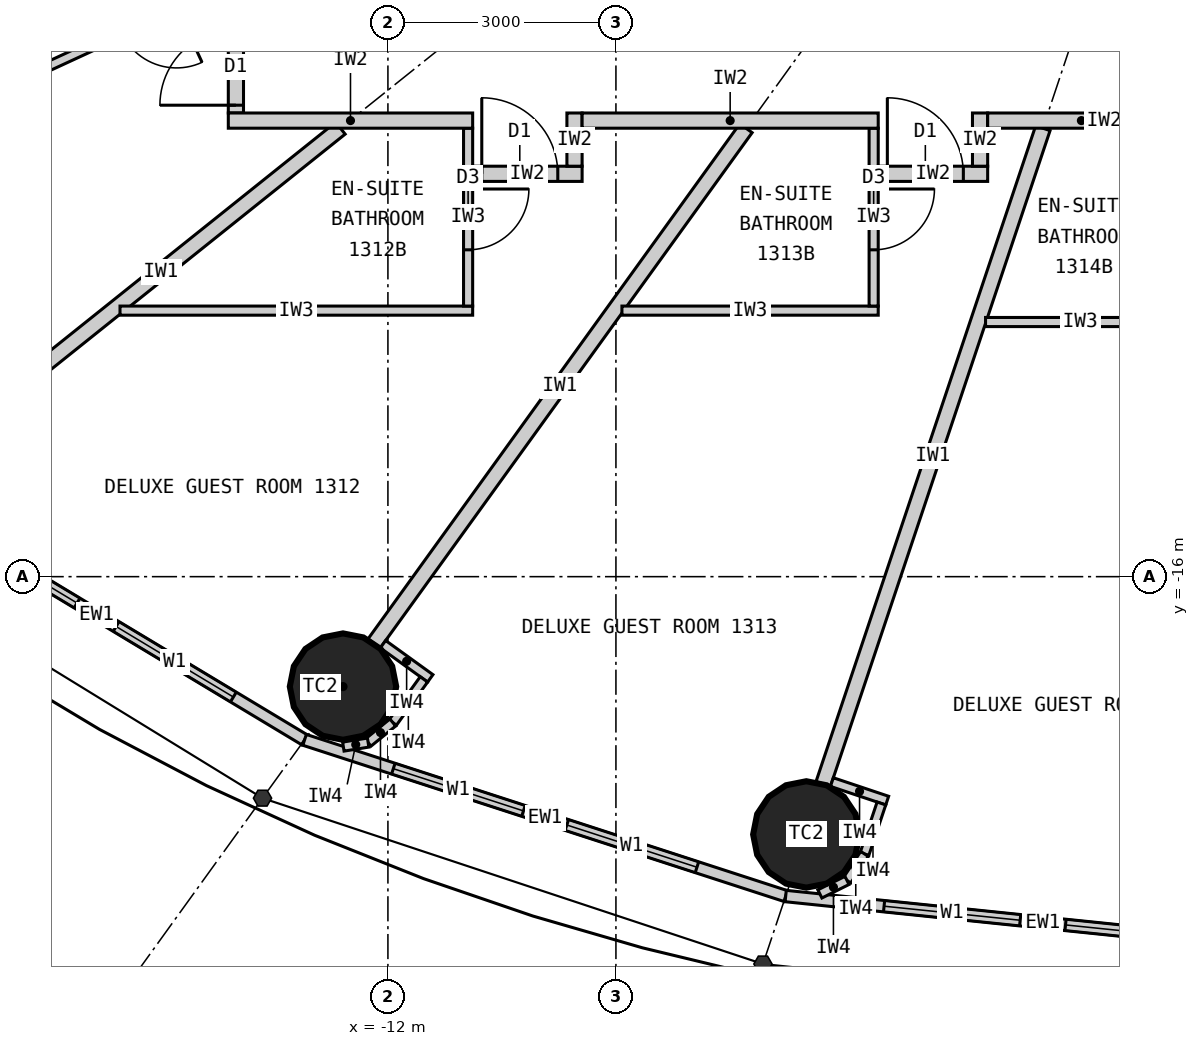
"""IFC4 building model, lengths in metres.
Left out: names, types, materials, properties, quantities, classifications, styles, units other than length and angle.
Written with IfcOpenShell. Run it as: python <this file> out.ifc"""

import sys

from ifc_helpers import new_model, si_unit, direction, frame, frame_2d, origin, origin_2d, place, context, subcontext, project, spatial, rectangle, circle, extrude, element, fill, save


model = new_model("IFC4")
c1 = context("Model", 3, precision=1e-05, world=origin(), true_north=direction((0.0, 1.0)))
c2 = subcontext(c1, "Body", "Model", "MODEL_VIEW")
j1 = project(units=[si_unit("LENGTHUNIT", "METRE"), si_unit("PLANEANGLEUNIT", "RADIAN")], contexts=[c1])
p1 = place(None, origin())
s1 = spatial("IfcSite", under=j1, at=p1, CompositionType="ELEMENT")
p2 = place(p1, origin())
s2 = spatial("IfcBuilding", under=s1, at=p2, CompositionType="ELEMENT")
p3 = place(p2, frame((0.0, 0.0, 57.3)))
s3 = spatial("IfcBuildingStorey", under=s2, at=p3, CompositionType="ELEMENT", Elevation=57.3)
for number, where, z_axis, x_axis in (
    (1, (-12.591, -17.447, 0.0), (0.0, 0.0, 1.0), (1.0, 0.0, 0.0)),
    (2, (-6.495, -19.391, 0.0), (0.0, 0.0, 1.0), (1.0, 0.0, 0.0)),
):
    element("IfcColumn", number, at=place(p3, frame(where, z_axis=z_axis, x_axis=x_axis)), inside=s3, PredefinedType="COLUMN", context=c2, shape_type="SweptSolid", body=[
        extrude(circle(Radius=0.7, at=origin_2d()), origin(), (0.0, 0.0, 1.0), 3.3),
    ])
p4 = place(p3, frame((-18.57, -14.856, 0.0), z_axis=(0.0, 0.0, 1.0), x_axis=(0.856983180864, -0.515344377787, 0.0)))
e3 = element("IfcWall", 3, at=p4, inside=s3, PredefinedType="ELEMENTEDWALL", context=c2, shape_type="SweptSolid", body=[
    extrude(rectangle(XDim=6.386, YDim=0.15, at=frame_2d((3.193, 0.0))), origin(), (0.0, 0.0, 1.0), 3.12),
])
p5 = place(p4, frame((1.093, 0.0, 0.9)))
e4 = element("IfcOpeningElement", 4, at=p5, cuts=e3, PredefinedType="OPENING", context=c2, shape_type="SweptSolid", body=[
    extrude(rectangle(XDim=1.8, YDim=1.9, at=frame_2d((0.9, 0.95))), frame((0.0, 0.085, 0.0), z_axis=(0.0, -1.0, 0.0), x_axis=(1.0, 0.0, 0.0)), (0.0, 0.0, 1.0), 0.17),
])
p6 = place(p4, frame((3.493, 0.0, 0.9)))
e5 = element("IfcOpeningElement", 5, at=p6, cuts=e3, PredefinedType="OPENING", context=c2, shape_type="SweptSolid", body=[
    extrude(rectangle(XDim=1.8, YDim=1.9, at=frame_2d((0.9, 0.95))), frame((0.0, 0.085, 0.0), z_axis=(0.0, -1.0, 0.0), x_axis=(1.0, 0.0, 0.0)), (0.0, 0.0, 1.0), 0.17),
])
p7 = place(p3, frame((-13.096, -18.147, 0.0), z_axis=(0.0, 0.0, 1.0), x_axis=(0.951137534625, -0.308767534285, 0.0)))
e6 = element("IfcWall", 6, at=p7, inside=s3, PredefinedType="ELEMENTEDWALL", context=c2, shape_type="SweptSolid", body=[
    extrude(rectangle(XDim=6.655, YDim=0.15, at=frame_2d((3.328, 0.0))), origin(), (0.0, 0.0, 1.0), 3.12),
])
p8 = place(p7, frame((1.228, 0.0, 0.9)))
e7 = element("IfcOpeningElement", 7, at=p8, cuts=e6, PredefinedType="OPENING", context=c2, shape_type="SweptSolid", body=[
    extrude(rectangle(XDim=1.8, YDim=1.9, at=frame_2d((0.9, 0.95))), frame((0.0, 0.085, 0.0), z_axis=(0.0, -1.0, 0.0), x_axis=(1.0, 0.0, 0.0)), (0.0, 0.0, 1.0), 0.17),
])
p9 = place(p7, frame((3.628, 0.0, 0.9)))
e8 = element("IfcOpeningElement", 8, at=p9, cuts=e6, PredefinedType="OPENING", context=c2, shape_type="SweptSolid", body=[
    extrude(rectangle(XDim=1.8, YDim=1.9, at=frame_2d((0.9, 0.95))), frame((0.0, 0.085, 0.0), z_axis=(0.0, -1.0, 0.0), x_axis=(1.0, 0.0, 0.0)), (0.0, 0.0, 1.0), 0.17),
])
p10 = place(p3, frame((-6.766, -20.202, 0.0), z_axis=(0.0, 0.0, 1.0), x_axis=(0.994721394369, -0.102612609291, 0.0)))
e9 = element("IfcWall", 9, at=p10, inside=s3, PredefinedType="ELEMENTEDWALL", context=c2, shape_type="SweptSolid", body=[
    extrude(rectangle(XDim=6.802, YDim=0.15, at=frame_2d((3.401, 0.0))), origin(), (0.0, 0.0, 1.0), 3.12),
])
p11 = place(p10, frame((1.301, 0.0, 0.9)))
e10 = element("IfcOpeningElement", 10, at=p11, cuts=e9, PredefinedType="OPENING", context=c2, shape_type="SweptSolid", body=[
    extrude(rectangle(XDim=1.8, YDim=1.9, at=frame_2d((0.9, 0.95))), frame((0.0, 0.085, 0.0), z_axis=(0.0, -1.0, 0.0), x_axis=(1.0, 0.0, 0.0)), (0.0, 0.0, 1.0), 0.17),
])
p12 = place(p10, frame((3.701, 0.0, 0.9)))
e11 = element("IfcOpeningElement", 11, at=p12, cuts=e9, PredefinedType="OPENING", context=c2, shape_type="SweptSolid", body=[
    extrude(rectangle(XDim=1.8, YDim=1.9, at=frame_2d((0.9, 0.95))), frame((0.0, 0.085, 0.0), z_axis=(0.0, -1.0, 0.0), x_axis=(1.0, 0.0, 0.0)), (0.0, 0.0, 1.0), 0.17),
])
p13 = place(p3, frame((-14.1, -6.512, 0.0), z_axis=(0.0, 0.0, 1.0), x_axis=(-0.907832871056, -0.419332181247, 0.0)))
e12 = element("IfcWall", 12, at=p13, inside=s3, PredefinedType="PARTITIONING", context=c2, shape_type="SweptSolid", body=[
    extrude(rectangle(XDim=8.023, YDim=0.2, at=frame_2d((4.011, 0.0))), origin(), (0.0, 0.0, 1.0), 2.32),
])
p14 = place(p3, frame((-12.625, -10.1, 0.0), z_axis=(0.0, 0.0, 1.0), x_axis=(-0.780892451574, -0.624665493744, 0.0)))
e13 = element("IfcWall", 13, at=p14, inside=s3, PredefinedType="PARTITIONING", context=c2, shape_type="SweptSolid", body=[
    extrude(rectangle(XDim=6.045, YDim=0.2, at=frame_2d((3.022, 0.0))), origin(), (0.0, 0.0, 1.0), 2.32),
])
p15 = place(p3, frame((-7.289, -10.1, 0.0), z_axis=(0.0, 0.0, 1.0), x_axis=(-0.585198353053, -0.810890182197, 0.0)))
e14 = element("IfcWall", 14, at=p15, inside=s3, PredefinedType="PARTITIONING", context=c2, shape_type="SweptSolid", body=[
    extrude(rectangle(XDim=8.36, YDim=0.2, at=frame_2d((4.18, 0.0))), origin(), (0.0, 0.0, 1.0), 2.32),
])
p16 = place(p3, frame((-3.383, -10.1, 0.0), z_axis=(0.0, 0.0, 1.0), x_axis=(-0.31759592231, -0.948226149256, 0.0)))
e15 = element("IfcWall", 15, at=p16, inside=s3, PredefinedType="PARTITIONING", context=c2, shape_type="SweptSolid", body=[
    extrude(rectangle(XDim=9.098, YDim=0.2, at=frame_2d((4.549, 0.0))), origin(), (0.0, 0.0, 1.0), 2.32),
])
p17 = place(p3, frame((-14.1, -8.193, 0.0), z_axis=(0.0, 0.0, 1.0), x_axis=(-0.907836493557, -0.419324338628, 0.0)))
e16 = element("IfcWall", 16, at=p17, inside=s3, PredefinedType="PARTITIONING", context=c2, shape_type="SweptSolid", body=[
    extrude(rectangle(XDim=3.49, YDim=0.12, at=frame_2d((1.745, 0.0))), origin(), (0.0, 0.0, 1.0), 3.12),
])
p18 = place(p17, frame((0.75, 0.0, 0.0)))
e17 = element("IfcOpeningElement", 17, at=p18, cuts=e16, PredefinedType="OPENING", context=c2, shape_type="SweptSolid", body=[
    extrude(rectangle(XDim=0.8, YDim=2.1, at=frame_2d((0.4, 1.05))), frame((0.0, 0.07, 0.0), z_axis=(0.0, -1.0, 0.0), x_axis=(1.0, 0.0, 0.0)), (0.0, 0.0, 1.0), 0.14),
])
p19 = place(p3, frame((-15.525, -12.5, 0.0), z_axis=(0.0, 0.0, 1.0), x_axis=(1.0, 0.0, 0.0)))
e18 = element("IfcWall", 18, at=p19, inside=s3, PredefinedType="PARTITIONING", context=c2, shape_type="SweptSolid", body=[
    extrude(rectangle(XDim=4.64, YDim=0.12, at=frame_2d((2.32, 0.0))), origin(), (0.0, 0.0, 1.0), 3.12),
])
p20 = place(p3, frame((-10.945, -10.1, 0.0), z_axis=(0.0, 0.0, 1.0), x_axis=(0.0, -1.0, 0.0)))
e19 = element("IfcWall", 19, at=p20, inside=s3, PredefinedType="PARTITIONING", context=c2, shape_type="SweptSolid", body=[
    extrude(rectangle(XDim=2.34, YDim=0.12, at=frame_2d((1.17, 0.0))), origin(), (0.0, 0.0, 1.0), 3.12),
])
p21 = place(p20, frame((0.8, 0.0, 0.0)))
e20 = element("IfcOpeningElement", 20, at=p21, cuts=e19, PredefinedType="OPENING", context=c2, shape_type="SweptSolid", body=[
    extrude(rectangle(XDim=0.8, YDim=2.1, at=frame_2d((0.4, 1.05))), frame((0.0, 0.07, 0.0), z_axis=(0.0, -1.0, 0.0), x_axis=(1.0, 0.0, 0.0)), (0.0, 0.0, 1.0), 0.14),
])
p22 = place(p3, frame((-8.921, -12.5, 0.0), z_axis=(0.0, 0.0, 1.0), x_axis=(1.0, 0.0, 0.0)))
e21 = element("IfcWall", 21, at=p22, inside=s3, PredefinedType="PARTITIONING", context=c2, shape_type="SweptSolid", body=[
    extrude(rectangle(XDim=3.372, YDim=0.12, at=frame_2d((1.686, 0.0))), origin(), (0.0, 0.0, 1.0), 3.12),
])
p23 = place(p3, frame((-5.609, -10.1, 0.0), z_axis=(0.0, 0.0, 1.0), x_axis=(0.0, -1.0, 0.0)))
e22 = element("IfcWall", 22, at=p23, inside=s3, PredefinedType="PARTITIONING", context=c2, shape_type="SweptSolid", body=[
    extrude(rectangle(XDim=2.34, YDim=0.12, at=frame_2d((1.17, 0.0))), origin(), (0.0, 0.0, 1.0), 3.12),
])
p24 = place(p23, frame((0.8, 0.0, 0.0)))
e23 = element("IfcOpeningElement", 23, at=p24, cuts=e22, PredefinedType="OPENING", context=c2, shape_type="SweptSolid", body=[
    extrude(rectangle(XDim=0.8, YDim=2.1, at=frame_2d((0.4, 1.05))), frame((0.0, 0.07, 0.0), z_axis=(0.0, -1.0, 0.0), x_axis=(1.0, 0.0, 0.0)), (0.0, 0.0, 1.0), 0.14),
])
p25 = place(p3, frame((-4.137, -12.65, 0.0), z_axis=(0.0, 0.0, 1.0), x_axis=(1.0, 0.0, 0.0)))
e24 = element("IfcWall", 24, at=p25, inside=s3, PredefinedType="PARTITIONING", context=c2, shape_type="SweptSolid", body=[
    extrude(rectangle(XDim=2.494, YDim=0.12, at=frame_2d((1.247, 0.0))), origin(), (0.0, 0.0, 1.0), 3.12),
])
p26 = place(p3, frame((-9.445, -10.7, 0.0), z_axis=(0.0, 0.0, 1.0), x_axis=(-1.0, 0.0, 0.0)))
e25 = element("IfcWall", 25, at=p26, inside=s3, PredefinedType="PARTITIONING", context=c2, shape_type="SweptSolid", body=[
    extrude(rectangle(XDim=1.44, YDim=0.2, at=frame_2d((0.72, 0.0))), origin(), (0.0, 0.0, 1.0), 3.12),
])
p27 = place(p26, frame((0.32, 0.0, 0.0)))
e26 = element("IfcOpeningElement", 26, at=p27, cuts=e25, PredefinedType="OPENING", context=c2, shape_type="SweptSolid", body=[
    extrude(rectangle(XDim=1.0, YDim=2.2, at=frame_2d((0.5, 1.1))), frame((0.0, 0.11, 0.0), z_axis=(0.0, -1.0, 0.0), x_axis=(1.0, 0.0, 0.0)), (0.0, 0.0, 1.0), 0.22),
])
p28 = place(p3, frame((-9.545, -9.9, 0.0), z_axis=(0.0, 0.0, 1.0), x_axis=(0.0, -1.0, 0.0)))
e27 = element("IfcWall", 27, at=p28, inside=s3, PredefinedType="PARTITIONING", context=c2, shape_type="SweptSolid", body=[
    extrude(rectangle(XDim=0.7, YDim=0.2, at=frame_2d((0.35, 0.0))), origin(), (0.0, 0.0, 1.0), 3.12),
])
p29 = place(p3, frame((-4.109, -10.7, 0.0), z_axis=(0.0, 0.0, 1.0), x_axis=(-1.0, 0.0, 0.0)))
e28 = element("IfcWall", 28, at=p29, inside=s3, PredefinedType="PARTITIONING", context=c2, shape_type="SweptSolid", body=[
    extrude(rectangle(XDim=1.44, YDim=0.2, at=frame_2d((0.72, 0.0))), origin(), (0.0, 0.0, 1.0), 3.12),
])
p30 = place(p29, frame((0.32, 0.0, 0.0)))
e29 = element("IfcOpeningElement", 29, at=p30, cuts=e28, PredefinedType="OPENING", context=c2, shape_type="SweptSolid", body=[
    extrude(rectangle(XDim=1.0, YDim=2.2, at=frame_2d((0.5, 1.1))), frame((0.0, 0.11, 0.0), z_axis=(0.0, -1.0, 0.0), x_axis=(1.0, 0.0, 0.0)), (0.0, 0.0, 1.0), 0.22),
])
p31 = place(p3, frame((-4.209, -9.9, 0.0), z_axis=(0.0, 0.0, 1.0), x_axis=(0.0, -1.0, 0.0)))
e30 = element("IfcWall", 30, at=p31, inside=s3, PredefinedType="PARTITIONING", context=c2, shape_type="SweptSolid", body=[
    extrude(rectangle(XDim=0.7, YDim=0.2, at=frame_2d((0.35, 0.0))), origin(), (0.0, 0.0, 1.0), 3.12),
])
p32 = place(p3, frame((-14.0, -4.772, 0.0), z_axis=(0.0, 0.0, 1.0), x_axis=(0.0, -1.0, 0.0)))
e31 = element("IfcWall", 31, at=p32, inside=s3, PredefinedType="PARTITIONING", context=c2, shape_type="SweptSolid", body=[
    extrude(rectangle(XDim=5.127, YDim=0.2, at=frame_2d((2.564, 0.0))), origin(), (0.0, 0.0, 1.0), 3.12),
])
p33 = place(p32, frame((4.025, 0.0, 0.0)))
e32 = element("IfcOpeningElement", 32, at=p33, cuts=e31, PredefinedType="OPENING", context=c2, shape_type="SweptSolid", body=[
    extrude(rectangle(XDim=1.0, YDim=2.2, at=frame_2d((0.5, 1.1))), frame((0.0, 0.11, 0.0), z_axis=(0.0, -1.0, 0.0), x_axis=(1.0, 0.0, 0.0)), (0.0, 0.0, 1.0), 0.22),
])
p34 = place(p3, frame((-1.643, -10.0, 0.0), z_axis=(0.0, 0.0, 1.0), x_axis=(-1.0, 0.0, 0.0)))
e33 = element("IfcWall", 33, at=p34, inside=s3, PredefinedType="PARTITIONING", context=c2, shape_type="SweptSolid", body=[
    extrude(rectangle(XDim=2.466, YDim=0.2, at=frame_2d((1.233, 0.0))), origin(), (0.0, 0.0, 1.0), 3.12),
])
p35 = place(p3, frame((-5.549, -10.0, 0.0), z_axis=(0.0, 0.0, 1.0), x_axis=(-1.0, 0.0, 0.0)))
e34 = element("IfcWall", 34, at=p35, inside=s3, PredefinedType="PARTITIONING", context=c2, shape_type="SweptSolid", body=[
    extrude(rectangle(XDim=3.896, YDim=0.2, at=frame_2d((1.948, 0.0))), origin(), (0.0, 0.0, 1.0), 3.12),
])
p36 = place(p3, frame((-10.885, -10.0, 0.0), z_axis=(0.0, 0.0, 1.0), x_axis=(-1.0, 0.0, 0.0)))
e35 = element("IfcWall", 35, at=p36, inside=s3, PredefinedType="PARTITIONING", context=c2, shape_type="SweptSolid", body=[
    extrude(rectangle(XDim=3.215, YDim=0.2, at=frame_2d((1.607, 0.0))), origin(), (0.0, 0.0, 1.0), 3.12),
])
p37 = place(p3, frame((-12.065, -16.889, 0.0), z_axis=(0.0, 0.0, 1.0), x_axis=(0.810821798253, -0.585293098778, 0.0)))
e36 = element("IfcWall", 36, at=p37, inside=s3, PredefinedType="PARTITIONING", context=c2, shape_type="SweptSolid", body=[
    extrude(rectangle(XDim=0.768, YDim=0.12, at=frame_2d((0.384, 0.0))), origin(), (0.0, 0.0, 1.0), 3.12),
])
p38 = place(p3, frame((-11.526, -17.351, 0.0), z_axis=(0.0, 0.0, 1.0), x_axis=(-0.585223113993, -0.810872312296, 0.0)))
e37 = element("IfcWall", 37, at=p38, inside=s3, PredefinedType="PARTITIONING", context=c2, shape_type="SweptSolid", body=[
    extrude(rectangle(XDim=0.7, YDim=0.12, at=frame_2d((0.35, 0.0))), origin(), (0.0, 0.0, 1.0), 3.12),
])
p39 = place(p3, frame((-11.936, -17.919, 0.0), z_axis=(0.0, 0.0, 1.0), x_axis=(-0.775023088441, -0.631932917629, 0.0)))
e38 = element("IfcWall", 38, at=p39, inside=s3, PredefinedType="PARTITIONING", context=c2, shape_type="SweptSolid", body=[
    extrude(rectangle(XDim=0.418, YDim=0.12, at=frame_2d((0.209, 0.0))), origin(), (0.0, 0.0, 1.0), 3.12),
])
p40 = place(p3, frame((-12.26, -18.183, 0.0), z_axis=(0.0, 0.0, 1.0), x_axis=(-0.987218661664, -0.159371622511, 0.0)))
e39 = element("IfcWall", 39, at=p40, inside=s3, PredefinedType="PARTITIONING", context=c2, shape_type="SweptSolid", body=[
    extrude(rectangle(XDim=0.331, YDim=0.12, at=frame_2d((0.166, 0.0))), origin(), (0.0, 0.0, 1.0), 3.12),
])
p41 = place(p3, frame((-6.159, -18.702, 0.0), z_axis=(0.0, 0.0, 1.0), x_axis=(0.948173154049, -0.31775410295, 0.0)))
e40 = element("IfcWall", 40, at=p41, inside=s3, PredefinedType="PARTITIONING", context=c2, shape_type="SweptSolid", body=[
    extrude(rectangle(XDim=0.768, YDim=0.12, at=frame_2d((0.384, 0.0))), origin(), (0.0, 0.0, 1.0), 3.12),
])
p42 = place(p3, frame((-5.507, -18.984, 0.0), z_axis=(0.0, 0.0, 1.0), x_axis=(-0.317692050622, -0.948193946918, 0.0)))
e41 = element("IfcWall", 41, at=p42, inside=s3, PredefinedType="PARTITIONING", context=c2, shape_type="SweptSolid", body=[
    extrude(rectangle(XDim=0.7, YDim=0.12, at=frame_2d((0.35, 0.0))), origin(), (0.0, 0.0, 1.0), 3.12),
])
p43 = place(p3, frame((-5.729, -19.648, 0.0), z_axis=(0.0, 0.0, 1.0), x_axis=(-0.552135764955, -0.833754218615, 0.0)))
e42 = element("IfcWall", 42, at=p43, inside=s3, PredefinedType="PARTITIONING", context=c2, shape_type="SweptSolid", body=[
    extrude(rectangle(XDim=0.418, YDim=0.12, at=frame_2d((0.209, 0.0))), origin(), (0.0, 0.0, 1.0), 3.12),
])
p44 = place(p3, frame((-5.96, -19.996, 0.0), z_axis=(0.0, 0.0, 1.0), x_axis=(-0.895160725913, -0.445743507842, 0.0)))
e43 = element("IfcWall", 43, at=p44, inside=s3, PredefinedType="PARTITIONING", context=c2, shape_type="SweptSolid", body=[
    extrude(rectangle(XDim=0.399, YDim=0.12, at=frame_2d((0.199, 0.0))), origin(), (0.0, 0.0, 1.0), 3.12),
])
p45 = place(p5, origin())
e44 = element("IfcWindow", 44, at=p45, inside=s3, PartitioningType="SINGLE_PANEL", PredefinedType="WINDOW", context=c2, shape_type="SweptSolid", body=[
    extrude(rectangle(XDim=1.8, YDim=1.9, at=frame_2d((0.9, 0.95))), frame((0.0, 0.03, 0.0), z_axis=(0.0, -1.0, 0.0), x_axis=(1.0, 0.0, 0.0)), (0.0, 0.0, 1.0), 0.06),
])
fill(e4, e44)
p46 = place(p6, origin())
e45 = element("IfcWindow", 45, at=p46, inside=s3, PartitioningType="SINGLE_PANEL", PredefinedType="WINDOW", context=c2, shape_type="SweptSolid", body=[
    extrude(rectangle(XDim=1.8, YDim=1.9, at=frame_2d((0.9, 0.95))), frame((0.0, 0.03, 0.0), z_axis=(0.0, -1.0, 0.0), x_axis=(1.0, 0.0, 0.0)), (0.0, 0.0, 1.0), 0.06),
])
fill(e5, e45)
p47 = place(p8, origin())
e46 = element("IfcWindow", 46, at=p47, inside=s3, PartitioningType="SINGLE_PANEL", PredefinedType="WINDOW", context=c2, shape_type="SweptSolid", body=[
    extrude(rectangle(XDim=1.8, YDim=1.9, at=frame_2d((0.9, 0.95))), frame((0.0, 0.03, 0.0), z_axis=(0.0, -1.0, 0.0), x_axis=(1.0, 0.0, 0.0)), (0.0, 0.0, 1.0), 0.06),
])
fill(e7, e46)
p48 = place(p9, origin())
e47 = element("IfcWindow", 47, at=p48, inside=s3, PartitioningType="SINGLE_PANEL", PredefinedType="WINDOW", context=c2, shape_type="SweptSolid", body=[
    extrude(rectangle(XDim=1.8, YDim=1.9, at=frame_2d((0.9, 0.95))), frame((0.0, 0.03, 0.0), z_axis=(0.0, -1.0, 0.0), x_axis=(1.0, 0.0, 0.0)), (0.0, 0.0, 1.0), 0.06),
])
fill(e8, e47)
p49 = place(p11, origin())
e48 = element("IfcWindow", 48, at=p49, inside=s3, PartitioningType="SINGLE_PANEL", PredefinedType="WINDOW", context=c2, shape_type="SweptSolid", body=[
    extrude(rectangle(XDim=1.8, YDim=1.9, at=frame_2d((0.9, 0.95))), frame((0.0, 0.03, 0.0), z_axis=(0.0, -1.0, 0.0), x_axis=(1.0, 0.0, 0.0)), (0.0, 0.0, 1.0), 0.06),
])
fill(e10, e48)
p50 = place(p12, origin())
e49 = element("IfcWindow", 49, at=p50, inside=s3, PartitioningType="SINGLE_PANEL", PredefinedType="WINDOW", context=c2, shape_type="SweptSolid", body=[
    extrude(rectangle(XDim=1.8, YDim=1.9, at=frame_2d((0.9, 0.95))), frame((0.0, 0.03, 0.0), z_axis=(0.0, -1.0, 0.0), x_axis=(1.0, 0.0, 0.0)), (0.0, 0.0, 1.0), 0.06),
])
fill(e11, e49)
p51 = place(p33, origin())
e50 = element("IfcDoor", 50, at=p51, inside=s3, OperationType="SINGLE_SWING_RIGHT", PredefinedType="DOOR", context=c2, shape_type="SweptSolid", body=[
    extrude(rectangle(XDim=1.0, YDim=2.2, at=frame_2d((0.5, 1.1))), frame((0.0, 0.025, 0.0), z_axis=(0.0, -1.0, 0.0), x_axis=(1.0, 0.0, 0.0)), (0.0, 0.0, 1.0), 0.05),
])
fill(e32, e50)
p52 = place(p21, origin())
e51 = element("IfcDoor", 51, at=p52, inside=s3, OperationType="SINGLE_SWING_LEFT", PredefinedType="DOOR", context=c2, shape_type="SweptSolid", body=[
    extrude(rectangle(XDim=0.8, YDim=2.1, at=frame_2d((0.4, 1.05))), frame((0.0, 0.025, 0.0), z_axis=(0.0, -1.0, 0.0), x_axis=(1.0, 0.0, 0.0)), (0.0, 0.0, 1.0), 0.05),
])
fill(e20, e51)
p53 = place(p27, origin())
e52 = element("IfcDoor", 52, at=p53, inside=s3, OperationType="SINGLE_SWING_RIGHT", PredefinedType="DOOR", context=c2, shape_type="SweptSolid", body=[
    extrude(rectangle(XDim=1.0, YDim=2.2, at=frame_2d((0.5, 1.1))), frame((0.0, 0.025, 0.0), z_axis=(0.0, -1.0, 0.0), x_axis=(1.0, 0.0, 0.0)), (0.0, 0.0, 1.0), 0.05),
])
fill(e26, e52)
p54 = place(p24, origin())
e53 = element("IfcDoor", 53, at=p54, inside=s3, OperationType="SINGLE_SWING_LEFT", PredefinedType="DOOR", context=c2, shape_type="SweptSolid", body=[
    extrude(rectangle(XDim=0.8, YDim=2.1, at=frame_2d((0.4, 1.05))), frame((0.0, 0.025, 0.0), z_axis=(0.0, -1.0, 0.0), x_axis=(1.0, 0.0, 0.0)), (0.0, 0.0, 1.0), 0.05),
])
fill(e23, e53)
p55 = place(p30, origin())
e54 = element("IfcDoor", 54, at=p55, inside=s3, OperationType="SINGLE_SWING_RIGHT", PredefinedType="DOOR", context=c2, shape_type="SweptSolid", body=[
    extrude(rectangle(XDim=1.0, YDim=2.2, at=frame_2d((0.5, 1.1))), frame((0.0, 0.025, 0.0), z_axis=(0.0, -1.0, 0.0), x_axis=(1.0, 0.0, 0.0)), (0.0, 0.0, 1.0), 0.05),
])
fill(e29, e54)
save(model, sys.argv[1])
